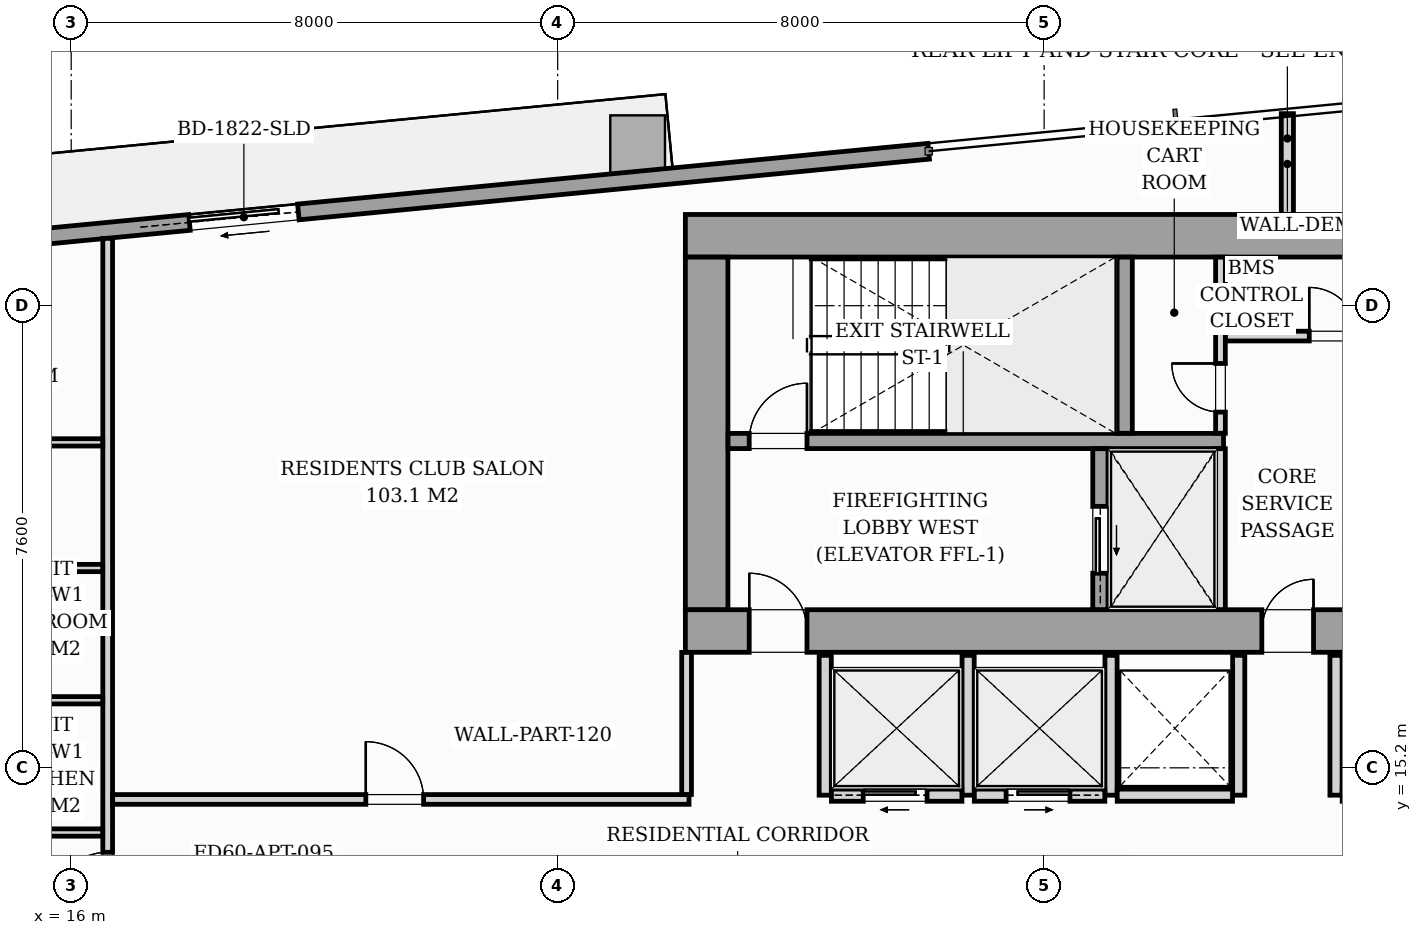
"""IFC4 building model, lengths in metres.
Left out: names, types, materials, properties, quantities, classifications, styles, units other than length and angle.
Written with IfcOpenShell. Run it as: python <this file> out.ifc"""

import sys

from ifc_helpers import new_model, si_unit, direction, frame, frame_2d, origin, origin_2d, place, context, subcontext, project, spatial, rectangle, i_section, extrude, source, transform, mapped, element, fill, save


model = new_model("IFC4")
c1 = context("Model", 3, precision=1e-05, world=origin(), true_north=direction((0.0, 1.0)))
c2 = subcontext(c1, "Body", "Model", "MODEL_VIEW")
j1 = project(units=[si_unit("LENGTHUNIT", "METRE"), si_unit("PLANEANGLEUNIT", "RADIAN")], contexts=[c1])
p1 = place(None, origin())
s1 = spatial("IfcSite", under=j1, at=p1, CompositionType="ELEMENT")
p2 = place(p1, origin())
s2 = spatial("IfcBuilding", under=s1, at=p2, CompositionType="ELEMENT")
p3 = place(p2, frame((0.0, 0.0, 77.8)))
s3 = spatial("IfcBuildingStorey", under=s2, at=p3, CompositionType="ELEMENT", Elevation=77.8)
m1 = source(origin(), c2, "Body", "SweptSolid", [
    extrude(i_section(OverallWidth=0.427, OverallDepth=0.483, WebThickness=0.051, FlangeThickness=0.082, FilletRadius=0.018, at=origin_2d()), origin(), (0.0, 0.0, 1.0), 3.196),
])
for number, where, z_axis, x_axis in (
    (1, (26.4, 17.4, 0.002), (0.0, 0.0, 1.0), (1.0, 0.0, 0.0)),
    (2, (33.12, 17.4, 0.002), (0.0, 0.0, 1.0), (1.0, 0.0, 0.0)),
    (3, (26.4, 24.0, 0.002), (0.0, 0.0, 1.0), (1.0, 0.0, 0.0)),
    (4, (33.12, 24.0, 0.002), (0.0, 0.0, 1.0), (1.0, 0.0, 0.0)),
):
    element("IfcColumn", number, at=place(p3, frame(where, z_axis=z_axis, x_axis=x_axis)), inside=s3, PredefinedType="PILASTER", context=c2, shape_type="MappedRepresentation", body=[
        mapped(m1, transform((0.0, 0.0, 0.0), scale=1.0)),
    ])
m2 = source(origin(), c2, "Body", "SweptSolid", [
    extrude(rectangle(XDim=0.9, YDim=1.1, at=origin_2d()), origin(), (0.0, 0.0, 1.0), 3.194),
])
p4 = place(p3, frame((25.315, 25.38, 0.004), z_axis=(0.0, 0.0, 1.0), x_axis=(0.995396198367, 0.09584575252, 0.0)))
e5 = element("IfcColumn", 5, at=p4, inside=s3, PredefinedType="COLUMN", context=c2, shape_type="MappedRepresentation", body=[
    mapped(m2, transform((0.0, 0.0, 0.0), scale=1.0)),
])
p5 = place(p3, frame((11.08, 23.508, 0.0), z_axis=(0.0, 0.0, 1.0), x_axis=(0.995396638587, 0.095841180552, 0.0)))
e6 = element("IfcWall", 6, at=p5, inside=s3, PredefinedType="STANDARD", context=c2, shape_type="SweptSolid", body=[
    extrude(rectangle(XDim=19.11, YDim=0.26, at=frame_2d((9.555, 0.0))), origin(), (0.0, 0.0, 1.0), 2.94),
])
p6 = place(p5, frame((6.896, 0.0, 0.0)))
e7 = element("IfcOpeningElement", 7, at=p6, cuts=e6, PredefinedType="OPENING", context=c2, shape_type="SweptSolid", body=[
    extrude(rectangle(XDim=1.8, YDim=2.06, at=frame_2d((0.9, 1.03))), frame((0.0, 0.14, 0.0), z_axis=(0.0, -1.0, 0.0), x_axis=(1.0, 0.0, 0.0)), (0.0, 0.0, 1.0), 0.28),
])
p7 = place(p5, frame((2.05, 0.0, 0.65)))
e8 = element("IfcOpeningElement", 8, at=p7, cuts=e6, PredefinedType="OPENING", context=c2, shape_type="SweptSolid", body=[
    extrude(rectangle(XDim=1.6, YDim=1.5, at=frame_2d((0.8, 0.75))), frame((0.0, 0.14, 0.0), z_axis=(0.0, -1.0, 0.0), x_axis=(1.0, 0.0, 0.0)), (0.0, 0.0, 1.0), 0.28),
])
p8 = place(p3, frame((26.1, 17.45, 0.0), z_axis=(0.0, 0.0, 1.0), x_axis=(1.0, 0.0, 0.0)))
e9 = element("IfcWall", 9, at=p8, inside=s3, PredefinedType="SHEAR", context=c2, shape_type="SweptSolid", body=[
    extrude(rectangle(XDim=19.8, YDim=0.7, at=frame_2d((9.9, 0.0))), origin(), (0.0, 0.0, 1.0), 3.2),
])
p9 = place(p8, frame((1.05, 0.0, 0.0)))
e10 = element("IfcOpeningElement", 10, at=p9, cuts=e9, PredefinedType="OPENING", context=c2, shape_type="SweptSolid", body=[
    extrude(rectangle(XDim=0.95, YDim=2.06, at=frame_2d((0.475, 1.03))), frame((0.0, 0.36, 0.0), z_axis=(0.0, -1.0, 0.0), x_axis=(1.0, 0.0, 0.0)), (0.0, 0.0, 1.0), 0.72),
])
p10 = place(p8, frame((9.48, 0.0, 0.0)))
e11 = element("IfcOpeningElement", 11, at=p10, cuts=e9, PredefinedType="OPENING", context=c2, shape_type="SweptSolid", body=[
    extrude(rectangle(XDim=0.85, YDim=2.0, at=frame_2d((0.425, 1.0))), frame((0.0, 0.36, 0.0), z_axis=(0.0, -1.0, 0.0), x_axis=(1.0, 0.0, 0.0)), (0.0, 0.0, 1.0), 0.72),
])
p11 = place(p8, frame((17.65, 0.0, 0.0)))
e12 = element("IfcOpeningElement", 12, at=p11, cuts=e9, PredefinedType="OPENING", context=c2, shape_type="SweptSolid", body=[
    extrude(rectangle(XDim=0.95, YDim=2.06, at=frame_2d((0.475, 1.03))), frame((0.0, 0.36, 0.0), z_axis=(0.0, -1.0, 0.0), x_axis=(1.0, 0.0, 0.0)), (0.0, 0.0, 1.0), 0.72),
])
p12 = place(p3, frame((26.1, 23.95, 0.0), z_axis=(0.0, 0.0, 1.0), x_axis=(1.0, 0.0, 0.0)))
e13 = element("IfcWall", 13, at=p12, inside=s3, PredefinedType="SHEAR", context=c2, shape_type="SweptSolid", body=[
    extrude(rectangle(XDim=19.8, YDim=0.7, at=frame_2d((9.9, 0.0))), origin(), (0.0, 0.0, 1.0), 3.2),
])
p13 = place(p3, frame((26.45, 17.802, 0.0), z_axis=(0.0, 0.0, 1.0), x_axis=(0.0, 1.0, 0.0)))
e14 = element("IfcWall", 14, at=p13, inside=s3, PredefinedType="SHEAR", context=c2, shape_type="SweptSolid", body=[
    extrude(rectangle(XDim=5.796, YDim=0.7, at=frame_2d((2.898, 0.0))), origin(), (0.0, 0.0, 1.0), 3.2),
])
p14 = place(p3, frame((26.802, 20.575, 0.0), z_axis=(0.0, 0.0, 1.0), x_axis=(1.0, 0.0, 0.0)))
e15 = element("IfcWall", 15, at=p14, inside=s3, PredefinedType="SOLIDWALL", context=c2, shape_type="SweptSolid", body=[
    extrude(rectangle(XDim=8.148, YDim=0.25, at=frame_2d((4.074, 0.0))), origin(), (0.0, 0.0, 1.0), 3.2),
])
p15 = place(p14, frame((0.348, 0.0, 0.0)))
e16 = element("IfcOpeningElement", 16, at=p15, cuts=e15, PredefinedType="OPENING", context=c2, shape_type="SweptSolid", body=[
    extrude(rectangle(XDim=0.95, YDim=2.06, at=frame_2d((0.475, 1.03))), frame((0.0, 0.135, 0.0), z_axis=(0.0, -1.0, 0.0), x_axis=(1.0, 0.0, 0.0)), (0.0, 0.0, 1.0), 0.27),
])
p16 = place(p3, frame((33.325, 20.702, 0.0), z_axis=(0.0, 0.0, 1.0), x_axis=(0.0, 1.0, 0.0)))
e17 = element("IfcWall", 17, at=p16, inside=s3, PredefinedType="SOLIDWALL", context=c2, shape_type="SweptSolid", body=[
    extrude(rectangle(XDim=2.896, YDim=0.25, at=frame_2d((1.448, 0.0))), origin(), (0.0, 0.0, 1.0), 3.2),
])
p17 = place(p3, frame((32.925, 17.802, 0.0), z_axis=(0.0, 0.0, 1.0), x_axis=(0.0, 1.0, 0.0)))
e18 = element("IfcWall", 18, at=p17, inside=s3, PredefinedType="SOLIDWALL", context=c2, shape_type="SweptSolid", body=[
    extrude(rectangle(XDim=2.646, YDim=0.25, at=frame_2d((1.323, 0.0))), origin(), (0.0, 0.0, 1.0), 3.2),
])
p18 = place(p17, frame((0.598, 0.0, 0.0)))
e19 = element("IfcOpeningElement", 19, at=p18, cuts=e18, PredefinedType="OPENING", context=c2, shape_type="SweptSolid", body=[
    extrude(rectangle(XDim=1.1, YDim=2.08, at=frame_2d((0.55, 1.04))), frame((0.0, 0.135, 0.0), z_axis=(0.0, -1.0, 0.0), x_axis=(1.0, 0.0, 0.0)), (0.0, 0.0, 1.0), 0.27),
])
p19 = place(p3, frame((34.9, 17.802, 0.0), z_axis=(0.0, 0.0, 1.0), x_axis=(0.0, 1.0, 0.0)))
e20 = element("IfcWall", 20, at=p19, inside=s3, PredefinedType="PARTITIONING", context=c2, shape_type="SweptSolid", body=[
    extrude(rectangle(XDim=2.646, YDim=0.16, at=frame_2d((1.323, 0.0))), origin(), (0.0, 0.0, 1.0), 2.94),
])
p20 = place(p3, frame((34.9, 20.702, 0.0), z_axis=(0.0, 0.0, 1.0), x_axis=(0.0, 1.0, 0.0)))
e21 = element("IfcWall", 21, at=p20, inside=s3, PredefinedType="PARTITIONING", context=c2, shape_type="SweptSolid", body=[
    extrude(rectangle(XDim=2.896, YDim=0.16, at=frame_2d((1.448, 0.0))), origin(), (0.0, 0.0, 1.0), 2.94),
])
p21 = place(p20, frame((0.348, 0.0, 0.0)))
e22 = element("IfcOpeningElement", 22, at=p21, cuts=e21, PredefinedType="OPENING", context=c2, shape_type="SweptSolid", body=[
    extrude(rectangle(XDim=0.8, YDim=2.05, at=frame_2d((0.4, 1.025))), frame((0.0, 0.09, 0.0), z_axis=(0.0, -1.0, 0.0), x_axis=(1.0, 0.0, 0.0)), (0.0, 0.0, 1.0), 0.18),
])
p22 = place(p3, frame((34.982, 22.3, 0.0), z_axis=(0.0, 0.0, 1.0), x_axis=(1.0, 0.0, 0.0)))
e23 = element("IfcWall", 23, at=p22, inside=s3, PredefinedType="PARTITIONING", context=c2, shape_type="SweptSolid", body=[
    extrude(rectangle(XDim=3.566, YDim=0.16, at=frame_2d((1.783, 0.0))), origin(), (0.0, 0.0, 1.0), 2.94),
])
p23 = place(p22, frame((1.378, 0.0, 0.0)))
e24 = element("IfcOpeningElement", 24, at=p23, cuts=e23, PredefinedType="OPENING", context=c2, shape_type="SweptSolid", body=[
    extrude(rectangle(XDim=0.8, YDim=2.05, at=frame_2d((0.4, 1.025))), frame((0.0, 0.09, 0.0), z_axis=(0.0, -1.0, 0.0), x_axis=(1.0, 0.0, 0.0)), (0.0, 0.0, 1.0), 0.18),
])
for number, where, z_axis, x_axis in (
    (25, (28.4, 14.75, 0.0), (0.0, 0.0, 1.0), (0.0, 1.0, 0.0)),
    (26, (30.75, 14.75, 0.0), (0.0, 0.0, 1.0), (0.0, 1.0, 0.0)),
    (27, (33.1, 14.75, 0.0), (0.0, 0.0, 1.0), (0.0, 1.0, 0.0)),
):
    element("IfcWall", number, at=place(p3, frame(where, z_axis=z_axis, x_axis=x_axis)), inside=s3, PredefinedType="PARTITIONING", context=c2, shape_type="SweptSolid", body=[
        extrude(rectangle(XDim=2.3, YDim=0.2, at=frame_2d((1.15, 0.0))), origin(), (0.0, 0.0, 1.0), 2.94),
    ])
p24 = place(p3, frame((28.502, 14.75, 0.0), z_axis=(0.0, 0.0, 1.0), x_axis=(1.0, 0.0, 0.0)))
e28 = element("IfcWall", 28, at=p24, inside=s3, PredefinedType="PARTITIONING", context=c2, shape_type="SweptSolid", body=[
    extrude(rectangle(XDim=2.146, YDim=0.2, at=frame_2d((1.073, 0.0))), origin(), (0.0, 0.0, 1.0), 2.94),
])
p25 = place(p24, frame((0.523, 0.0, 0.0)))
e29 = element("IfcOpeningElement", 29, at=p25, cuts=e28, PredefinedType="OPENING", context=c2, shape_type="SweptSolid", body=[
    extrude(rectangle(XDim=1.05, YDim=2.08, at=frame_2d((0.525, 1.04))), frame((0.0, 0.11, 0.0), z_axis=(0.0, -1.0, 0.0), x_axis=(1.0, 0.0, 0.0)), (0.0, 0.0, 1.0), 0.22),
])
p26 = place(p3, frame((30.852, 14.75, 0.0), z_axis=(0.0, 0.0, 1.0), x_axis=(1.0, 0.0, 0.0)))
e30 = element("IfcWall", 30, at=p26, inside=s3, PredefinedType="PARTITIONING", context=c2, shape_type="SweptSolid", body=[
    extrude(rectangle(XDim=2.146, YDim=0.2, at=frame_2d((1.073, 0.0))), origin(), (0.0, 0.0, 1.0), 2.94),
])
p27 = place(p26, frame((0.523, 0.0, 0.0)))
e31 = element("IfcOpeningElement", 31, at=p27, cuts=e30, PredefinedType="OPENING", context=c2, shape_type="SweptSolid", body=[
    extrude(rectangle(XDim=1.05, YDim=2.08, at=frame_2d((0.525, 1.04))), frame((0.0, 0.11, 0.0), z_axis=(0.0, -1.0, 0.0), x_axis=(1.0, 0.0, 0.0)), (0.0, 0.0, 1.0), 0.22),
])
p28 = place(p3, frame((35.2, 14.75, 0.0), z_axis=(0.0, 0.0, 1.0), x_axis=(0.0, 1.0, 0.0)))
e32 = element("IfcWall", 32, at=p28, inside=s3, PredefinedType="PARTITIONING", context=c2, shape_type="SweptSolid", body=[
    extrude(rectangle(XDim=2.3, YDim=0.2, at=frame_2d((1.15, 0.0))), origin(), (0.0, 0.0, 1.0), 2.94),
])
p29 = place(p3, frame((33.202, 14.75, 0.0), z_axis=(0.0, 0.0, 1.0), x_axis=(1.0, 0.0, 0.0)))
e33 = element("IfcWall", 33, at=p29, inside=s3, PredefinedType="PARTITIONING", context=c2, shape_type="SweptSolid", body=[
    extrude(rectangle(XDim=1.896, YDim=0.2, at=frame_2d((0.948, 0.0))), origin(), (0.0, 0.0, 1.0), 2.94),
])
p30 = place(p3, frame((36.8, 14.75, 0.0), z_axis=(0.0, 0.0, 1.0), x_axis=(0.0, 1.0, 0.0)))
e34 = element("IfcWall", 34, at=p30, inside=s3, PredefinedType="PARTITIONING", context=c2, shape_type="SweptSolid", body=[
    extrude(rectangle(XDim=2.3, YDim=0.2, at=frame_2d((1.15, 0.0))), origin(), (0.0, 0.0, 1.0), 2.94),
])
p31 = place(p3, frame((16.6, 12.432, 0.0), z_axis=(0.0, 0.0, 1.0), x_axis=(0.0, 1.0, 0.0)))
e35 = element("IfcWall", 35, at=p31, inside=s3, PredefinedType="PARTITIONING", context=c2, shape_type="SweptSolid", body=[
    extrude(rectangle(XDim=11.475, YDim=0.16, at=frame_2d((5.738, 0.0))), origin(), (0.0, 0.0, 1.0), 2.94),
])
p32 = place(p31, frame((0.429, 0.0, 0.0)))
e36 = element("IfcOpeningElement", 36, at=p32, cuts=e35, PredefinedType="OPENING", context=c2, shape_type="SweptSolid", body=[
    extrude(rectangle(XDim=0.95, YDim=2.06, at=frame_2d((0.475, 1.03))), frame((0.0, 0.09, 0.0), z_axis=(0.0, -1.0, 0.0), x_axis=(1.0, 0.0, 0.0)), (0.0, 0.0, 1.0), 0.18),
])
p33 = place(p3, frame((36.0, 24.302, 0.0), z_axis=(0.0, 0.0, 1.0), x_axis=(0.0, 1.0, 0.0)))
e37 = element("IfcWall", 37, at=p33, inside=s3, PredefinedType="PARTITIONING", context=c2, shape_type="SweptSolid", body=[
    extrude(rectangle(XDim=1.656, YDim=0.2, at=frame_2d((0.828, 0.0))), origin(), (0.0, 0.0, 1.0), 2.94),
])
for number, where, z_axis, x_axis in (
    (38, (14.262, 16.311, 0.0), (0.0, 0.0, 1.0), (1.0, 0.0, 0.0)),
    (39, (14.262, 14.136, 0.0), (0.0, 0.0, 1.0), (1.0, 0.0, 0.0)),
    (40, (14.262, 18.486, 0.0), (0.0, 0.0, 1.0), (1.0, 0.0, 0.0)),
):
    element("IfcWall", number, at=place(p3, frame(where, z_axis=z_axis, x_axis=x_axis)), inside=s3, PredefinedType="PARTITIONING", context=c2, shape_type="SweptSolid", body=[
        extrude(rectangle(XDim=2.256, YDim=0.12, at=frame_2d((1.128, 0.0))), origin(), (0.0, 0.0, 1.0), 2.94),
    ])
p34 = place(p3, frame((8.933, 20.552, 0.0), z_axis=(0.0, 0.0, 1.0), x_axis=(1.0, 0.0, 0.0)))
e41 = element("IfcWall", 41, at=p34, inside=s3, PredefinedType="PARTITIONING", context=c2, shape_type="SweptSolid", body=[
    extrude(rectangle(XDim=7.585, YDim=0.12, at=frame_2d((3.792, 0.0))), origin(), (0.0, 0.0, 1.0), 2.94),
])
p35 = place(p34, frame((3.944, 0.0, 0.0)))
e42 = element("IfcOpeningElement", 42, at=p35, cuts=e41, PredefinedType="OPENING", context=c2, shape_type="SweptSolid", body=[
    extrude(rectangle(XDim=0.55, YDim=2.0, at=frame_2d((0.275, 1.0))), frame((0.0, 0.07, 0.0), z_axis=(0.0, -1.0, 0.0), x_axis=(1.0, 0.0, 0.0)), (0.0, 0.0, 1.0), 0.14),
])
p36 = place(p3, frame((16.682, 14.68, 0.0), z_axis=(0.0, 0.0, 1.0), x_axis=(1.0, 0.0, 0.0)))
e43 = element("IfcWall", 43, at=p36, inside=s3, PredefinedType="PARTITIONING", context=c2, shape_type="SweptSolid", body=[
    extrude(rectangle(XDim=9.478, YDim=0.16, at=frame_2d((4.739, 0.0))), origin(), (0.0, 0.0, 1.0), 2.94),
])
p37 = place(p36, frame((4.163, 0.0, 0.0)))
e44 = element("IfcOpeningElement", 44, at=p37, cuts=e43, PredefinedType="OPENING", context=c2, shape_type="SweptSolid", body=[
    extrude(rectangle(XDim=0.95, YDim=2.06, at=frame_2d((0.475, 1.03))), frame((0.0, 0.09, 0.0), z_axis=(0.0, -1.0, 0.0), x_axis=(1.0, 0.0, 0.0)), (0.0, 0.0, 1.0), 0.18),
])
p38 = place(p3, frame((26.12, 14.762, 0.0), z_axis=(0.0, 0.0, 1.0), x_axis=(0.0, 1.0, 0.0)))
e45 = element("IfcWall", 45, at=p38, inside=s3, PredefinedType="PARTITIONING", context=c2, shape_type="SweptSolid", body=[
    extrude(rectangle(XDim=2.336, YDim=0.16, at=frame_2d((1.168, 0.0))), origin(), (0.0, 0.0, 1.0), 2.94),
])
m3 = source(origin(), c2, "Body", "SweptSolid", [
    extrude(rectangle(XDim=1.8, YDim=2.06, at=frame_2d((0.9, 1.03))), frame((0.0, 0.025, 0.0), z_axis=(0.0, -1.0, 0.0), x_axis=(1.0, 0.0, 0.0)), (0.0, 0.0, 1.0), 0.05),
])
p39 = place(p6, origin())
e46 = element("IfcDoor", 46, at=p39, inside=s3, OperationType="SLIDING_TO_LEFT", PredefinedType="DOOR", context=c2, shape_type="MappedRepresentation", body=[
    mapped(m3, transform((0.0, 0.0, 0.0), scale=1.0)),
])
fill(e7, e46)
m4 = source(origin(), c2, "Body", "SweptSolid", [
    extrude(rectangle(XDim=0.95, YDim=2.06, at=frame_2d((0.475, 1.03))), frame((0.0, 0.025, 0.0), z_axis=(0.0, -1.0, 0.0), x_axis=(1.0, 0.0, 0.0)), (0.0, 0.0, 1.0), 0.05),
])
p40 = place(p9, origin())
e47 = element("IfcDoor", 47, at=p40, inside=s3, OperationType="SINGLE_SWING_LEFT", PredefinedType="DOOR", context=c2, shape_type="MappedRepresentation", body=[
    mapped(m4, transform((0.0, 0.0, 0.0), scale=1.0)),
])
fill(e10, e47)
m5 = source(origin(), c2, "Body", "SweptSolid", [
    extrude(rectangle(XDim=0.85, YDim=2.0, at=frame_2d((0.425, 1.0))), frame((0.0, 0.025, 0.0), z_axis=(0.0, -1.0, 0.0), x_axis=(1.0, 0.0, 0.0)), (0.0, 0.0, 1.0), 0.05),
])
p41 = place(p10, origin())
e48 = element("IfcDoor", 48, at=p41, inside=s3, OperationType="SINGLE_SWING_RIGHT", PredefinedType="DOOR", context=c2, shape_type="MappedRepresentation", body=[
    mapped(m5, transform((0.0, 0.0, 0.0), scale=1.0)),
])
fill(e11, e48)
p42 = place(p15, origin())
e49 = element("IfcDoor", 49, at=p42, inside=s3, OperationType="SINGLE_SWING_RIGHT", PredefinedType="DOOR", context=c2, shape_type="MappedRepresentation", body=[
    mapped(m4, transform((0.0, 0.0, 0.0), scale=1.0)),
])
fill(e16, e49)
m6 = source(origin(), c2, "Body", "SweptSolid", [
    extrude(rectangle(XDim=1.1, YDim=2.08, at=frame_2d((0.55, 1.04))), frame((0.0, 0.025, 0.0), z_axis=(0.0, -1.0, 0.0), x_axis=(1.0, 0.0, 0.0)), (0.0, 0.0, 1.0), 0.05),
])
p43 = place(p18, origin())
e50 = element("IfcDoor", 50, at=p43, inside=s3, OperationType="SLIDING_TO_LEFT", PredefinedType="DOOR", context=c2, shape_type="MappedRepresentation", body=[
    mapped(m6, transform((0.0, 0.0, 0.0), scale=1.0)),
])
fill(e19, e50)
m7 = source(origin(), c2, "Body", "SweptSolid", [
    extrude(rectangle(XDim=0.8, YDim=2.05, at=frame_2d((0.4, 1.025))), frame((0.0, 0.025, 0.0), z_axis=(0.0, -1.0, 0.0), x_axis=(1.0, 0.0, 0.0)), (0.0, 0.0, 1.0), 0.05),
])
p44 = place(p21, origin())
e51 = element("IfcDoor", 51, at=p44, inside=s3, OperationType="SINGLE_SWING_RIGHT", PredefinedType="DOOR", context=c2, shape_type="MappedRepresentation", body=[
    mapped(m7, transform((0.0, 0.0, 0.0), scale=1.0)),
])
fill(e22, e51)
p45 = place(p23, origin())
e52 = element("IfcDoor", 52, at=p45, inside=s3, OperationType="SINGLE_SWING_LEFT", PredefinedType="DOOR", context=c2, shape_type="MappedRepresentation", body=[
    mapped(m7, transform((0.0, 0.0, 0.0), scale=1.0)),
])
fill(e24, e52)
m8 = source(origin(), c2, "Body", "SweptSolid", [
    extrude(rectangle(XDim=1.05, YDim=2.08, at=frame_2d((0.525, 1.04))), frame((0.0, 0.025, 0.0), z_axis=(0.0, -1.0, 0.0), x_axis=(1.0, 0.0, 0.0)), (0.0, 0.0, 1.0), 0.05),
])
p46 = place(p25, origin())
e53 = element("IfcDoor", 53, at=p46, inside=s3, OperationType="SLIDING_TO_LEFT", PredefinedType="DOOR", context=c2, shape_type="MappedRepresentation", body=[
    mapped(m8, transform((0.0, 0.0, 0.0), scale=1.0)),
])
fill(e29, e53)
p47 = place(p27, origin())
e54 = element("IfcDoor", 54, at=p47, inside=s3, OperationType="SLIDING_TO_RIGHT", PredefinedType="DOOR", context=c2, shape_type="MappedRepresentation", body=[
    mapped(m8, transform((0.0, 0.0, 0.0), scale=1.0)),
])
fill(e31, e54)
m9 = source(origin(), c2, "Body", "SweptSolid", [
    extrude(rectangle(XDim=0.95, YDim=2.06, at=frame_2d((0.475, 1.03))), frame((0.0, 0.025, 0.0), z_axis=(0.0, -1.0, 0.0), x_axis=(1.0, 0.0, 0.0)), (0.0, 0.0, 1.0), 0.05),
])
p48 = place(p32, origin())
e55 = element("IfcDoor", 55, at=p48, inside=s3, OperationType="SINGLE_SWING_LEFT", PredefinedType="DOOR", context=c2, shape_type="MappedRepresentation", body=[
    mapped(m9, transform((0.0, 0.0, 0.0), scale=1.0)),
])
fill(e36, e55)
p49 = place(p37, origin())
e56 = element("IfcDoor", 56, at=p49, inside=s3, OperationType="SINGLE_SWING_LEFT", PredefinedType="DOOR", context=c2, shape_type="MappedRepresentation", body=[
    mapped(m9, transform((0.0, 0.0, 0.0), scale=1.0)),
])
fill(e44, e56)
save(model, sys.argv[1])
